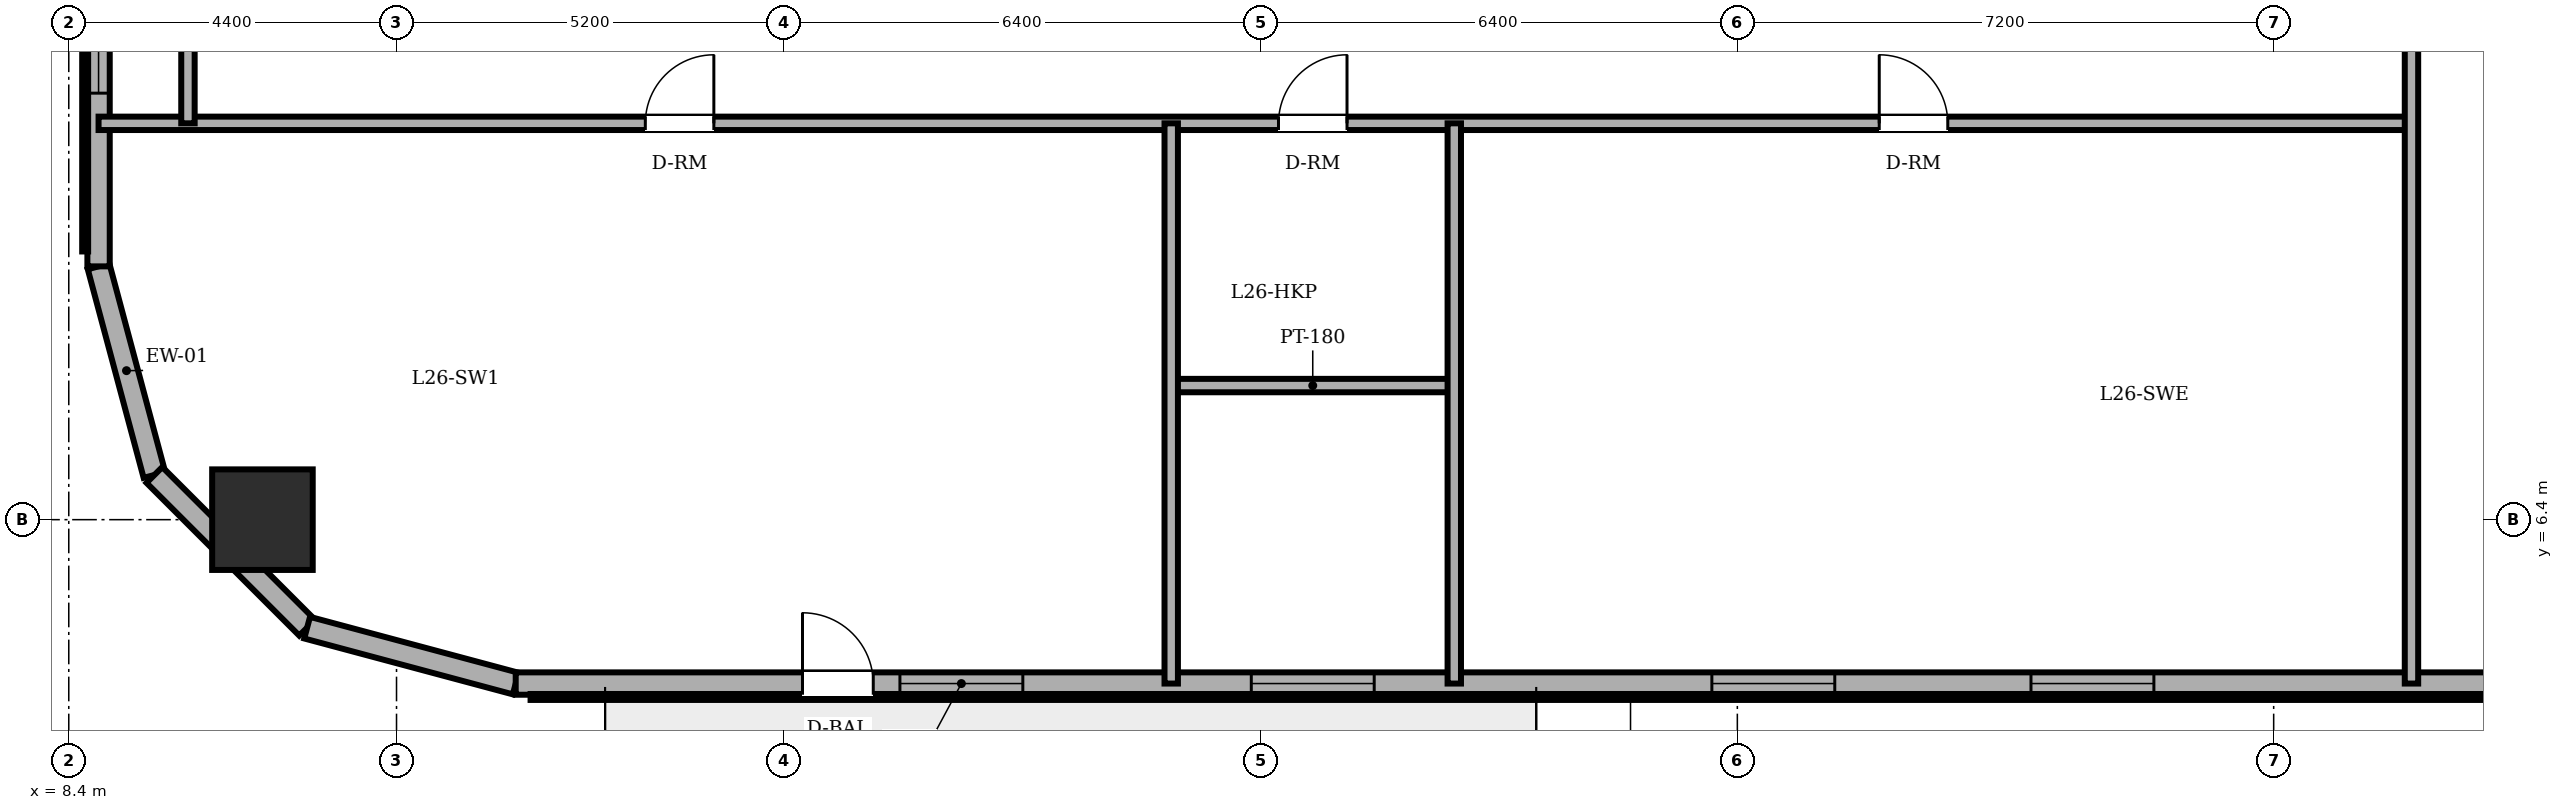
"""IFC4 building model, lengths in metres.
Left out: names, types, materials, properties, quantities, classifications, styles, units other than length and angle.
Written with IfcOpenShell. Run it as: python <this file> out.ifc"""

import sys

from ifc_helpers import new_model, si_unit, direction, frame, frame_2d, origin, origin_2d, place, context, subcontext, project, spatial, rectangle, circle, extrude, element, fill, save


model = new_model("IFC4")
c1 = context("Model", 3, precision=1e-05, world=origin(), true_north=direction((0.0, 1.0)))
c2 = subcontext(c1, "Body", "Model", "MODEL_VIEW")
j1 = project(units=[si_unit("LENGTHUNIT", "METRE"), si_unit("PLANEANGLEUNIT", "RADIAN")], contexts=[c1])
p1 = place(None, origin())
s1 = spatial("IfcSite", under=j1, at=p1, CompositionType="ELEMENT")
p2 = place(p1, origin())
s2 = spatial("IfcBuilding", under=s1, at=p2, CompositionType="ELEMENT")
p3 = place(p2, frame((0.0, 0.0, 100.7)))
s3 = spatial("IfcBuildingStorey", under=s2, at=p3, CompositionType="ELEMENT", Elevation=100.7)
p4 = place(p3, frame((11.0, 6.4, 0.0), z_axis=(0.0, 0.0, 1.0), x_axis=(1.0, 0.0, 0.0)))
e1 = element("IfcColumn", 1, at=p4, inside=s3, PredefinedType="COLUMN", context=c2, shape_type="SweptSolid", body=[
    extrude(circle(Radius=0.675, at=origin_2d()), origin(), (0.0, 0.0, 1.0), 3.6),
])
p5 = place(p3, frame((8.8, 9.8, 0.0), z_axis=(0.0, 0.0, 1.0), x_axis=(0.258731875344, -0.96594917914, 0.0)))
e2 = element("IfcWall", 2, at=p5, inside=s3, PredefinedType="SOLIDWALL", context=c2, shape_type="SweptSolid", body=[
    extrude(rectangle(XDim=2.899, YDim=0.3, at=frame_2d((1.449, 0.0))), origin(), (0.0, 0.0, 1.0), 3.4),
])
p6 = place(p3, frame((9.55, 7.0, 0.0), z_axis=(0.0, 0.0, 1.0), x_axis=(0.707106781187, -0.707106781187, 0.0)))
e3 = element("IfcWall", 3, at=p6, inside=s3, PredefinedType="SOLIDWALL", context=c2, shape_type="SweptSolid", body=[
    extrude(rectangle(XDim=2.899, YDim=0.3, at=frame_2d((1.45, 0.0))), origin(), (0.0, 0.0, 1.0), 3.4),
])
p7 = place(p3, frame((11.6, 4.95, 0.0), z_axis=(0.0, 0.0, 1.0), x_axis=(0.965943540406, -0.258752926066, 0.0)))
e4 = element("IfcWall", 4, at=p7, inside=s3, PredefinedType="SOLIDWALL", context=c2, shape_type="SweptSolid", body=[
    extrude(rectangle(XDim=2.898, YDim=0.3, at=frame_2d((1.449, 0.0))), origin(), (0.0, 0.0, 1.0), 3.4),
])
p8 = place(p3, frame((14.4, 4.2, 0.0), z_axis=(0.0, 0.0, 1.0), x_axis=(1.0, 0.0, 0.0)))
e5 = element("IfcWall", 5, at=p8, inside=s3, PredefinedType="SOLIDWALL", context=c2, shape_type="SweptSolid", body=[
    extrude(rectangle(XDim=29.933, YDim=0.3, at=frame_2d((14.967, 0.0))), origin(), (0.0, 0.0, 1.0), 3.4),
])
p9 = place(p8, frame((3.85, 0.0, 0.0)))
e6 = element("IfcOpeningElement", 6, at=p9, cuts=e5, PredefinedType="OPENING", context=c2, shape_type="SweptSolid", body=[
    extrude(rectangle(XDim=0.95, YDim=2.2, at=frame_2d((0.475, 1.1))), frame((0.0, 0.16, 0.0), z_axis=(0.0, -1.0, 0.0), x_axis=(1.0, 0.0, 0.0)), (0.0, 0.0, 1.0), 0.32),
])
p10 = place(p8, frame((5.158, 0.0, 0.85)))
e7 = element("IfcOpeningElement", 7, at=p10, cuts=e5, PredefinedType="OPENING", context=c2, shape_type="SweptSolid", body=[
    extrude(rectangle(XDim=1.65, YDim=1.55, at=frame_2d((0.825, 0.775))), frame((0.0, 0.16, 0.0), z_axis=(0.0, -1.0, 0.0), x_axis=(1.0, 0.0, 0.0)), (0.0, 0.0, 1.0), 0.32),
])
p11 = place(p8, frame((9.875, 0.0, 0.85)))
e8 = element("IfcOpeningElement", 8, at=p11, cuts=e5, PredefinedType="OPENING", context=c2, shape_type="SweptSolid", body=[
    extrude(rectangle(XDim=1.65, YDim=1.55, at=frame_2d((0.825, 0.775))), frame((0.0, 0.16, 0.0), z_axis=(0.0, -1.0, 0.0), x_axis=(1.0, 0.0, 0.0)), (0.0, 0.0, 1.0), 0.32),
])
p12 = place(p8, frame((16.058, 0.0, 0.85)))
e9 = element("IfcOpeningElement", 9, at=p12, cuts=e5, PredefinedType="OPENING", context=c2, shape_type="SweptSolid", body=[
    extrude(rectangle(XDim=1.65, YDim=1.55, at=frame_2d((0.825, 0.775))), frame((0.0, 0.16, 0.0), z_axis=(0.0, -1.0, 0.0), x_axis=(1.0, 0.0, 0.0)), (0.0, 0.0, 1.0), 0.32),
])
p13 = place(p8, frame((20.342, 0.0, 0.85)))
e10 = element("IfcOpeningElement", 10, at=p13, cuts=e5, PredefinedType="OPENING", context=c2, shape_type="SweptSolid", body=[
    extrude(rectangle(XDim=1.65, YDim=1.55, at=frame_2d((0.825, 0.775))), frame((0.0, 0.16, 0.0), z_axis=(0.0, -1.0, 0.0), x_axis=(1.0, 0.0, 0.0)), (0.0, 0.0, 1.0), 0.32),
])
p14 = place(p8, frame((26.692, 0.0, 0.85)))
e11 = element("IfcOpeningElement", 11, at=p14, cuts=e5, PredefinedType="OPENING", context=c2, shape_type="SweptSolid", body=[
    extrude(rectangle(XDim=1.65, YDim=1.55, at=frame_2d((0.825, 0.775))), frame((0.0, 0.16, 0.0), z_axis=(0.0, -1.0, 0.0), x_axis=(1.0, 0.0, 0.0)), (0.0, 0.0, 1.0), 0.32),
])
p15 = place(p3, frame((8.8, 38.2, 0.0), z_axis=(0.0, 0.0, 1.0), x_axis=(0.0, -1.0, 0.0)))
e12 = element("IfcWall", 12, at=p15, inside=s3, PredefinedType="SOLIDWALL", context=c2, shape_type="SweptSolid", body=[
    extrude(rectangle(XDim=28.4, YDim=0.3, at=frame_2d((14.2, 0.0))), origin(), (0.0, 0.0, 1.0), 3.4),
])
p16 = place(p15, frame((2.325, 0.0, 0.85)))
e13 = element("IfcOpeningElement", 13, at=p16, cuts=e12, PredefinedType="OPENING", context=c2, shape_type="SweptSolid", body=[
    extrude(rectangle(XDim=1.65, YDim=1.55, at=frame_2d((0.825, 0.775))), frame((0.0, 0.16, 0.0), z_axis=(0.0, -1.0, 0.0), x_axis=(1.0, 0.0, 0.0)), (0.0, 0.0, 1.0), 0.32),
])
p17 = place(p15, frame((7.328, 0.0, 0.85)))
e14 = element("IfcOpeningElement", 14, at=p17, cuts=e12, PredefinedType="OPENING", context=c2, shape_type="SweptSolid", body=[
    extrude(rectangle(XDim=1.65, YDim=1.55, at=frame_2d((0.825, 0.775))), frame((0.0, 0.16, 0.0), z_axis=(0.0, -1.0, 0.0), x_axis=(1.0, 0.0, 0.0)), (0.0, 0.0, 1.0), 0.32),
])
p18 = place(p15, frame((11.102, 0.0, 0.85)))
e15 = element("IfcOpeningElement", 15, at=p18, cuts=e12, PredefinedType="OPENING", context=c2, shape_type="SweptSolid", body=[
    extrude(rectangle(XDim=1.65, YDim=1.55, at=frame_2d((0.825, 0.775))), frame((0.0, 0.16, 0.0), z_axis=(0.0, -1.0, 0.0), x_axis=(1.0, 0.0, 0.0)), (0.0, 0.0, 1.0), 0.32),
])
p19 = place(p15, frame((17.648, 0.0, 0.85)))
e16 = element("IfcOpeningElement", 16, at=p19, cuts=e12, PredefinedType="OPENING", context=c2, shape_type="SweptSolid", body=[
    extrude(rectangle(XDim=1.65, YDim=1.55, at=frame_2d((0.825, 0.775))), frame((0.0, 0.16, 0.0), z_axis=(0.0, -1.0, 0.0), x_axis=(1.0, 0.0, 0.0)), (0.0, 0.0, 1.0), 0.32),
])
p20 = place(p15, frame((20.422, 0.0, 0.85)))
e17 = element("IfcOpeningElement", 17, at=p20, cuts=e12, PredefinedType="OPENING", context=c2, shape_type="SweptSolid", body=[
    extrude(rectangle(XDim=1.65, YDim=1.55, at=frame_2d((0.825, 0.775))), frame((0.0, 0.16, 0.0), z_axis=(0.0, -1.0, 0.0), x_axis=(1.0, 0.0, 0.0)), (0.0, 0.0, 1.0), 0.32),
])
p21 = place(p15, frame((24.425, 0.0, 0.85)))
e18 = element("IfcOpeningElement", 18, at=p21, cuts=e12, PredefinedType="OPENING", context=c2, shape_type="SweptSolid", body=[
    extrude(rectangle(XDim=1.65, YDim=1.55, at=frame_2d((0.825, 0.775))), frame((0.0, 0.16, 0.0), z_axis=(0.0, -1.0, 0.0), x_axis=(1.0, 0.0, 0.0)), (0.0, 0.0, 1.0), 0.32),
])
p22 = place(p3, frame((23.2, 8.2, 0.0), z_axis=(0.0, 0.0, 1.0), x_axis=(1.0, 0.0, 0.0)))
e19 = element("IfcWall", 19, at=p22, inside=s3, PredefinedType="PARTITIONING", context=c2, shape_type="SweptSolid", body=[
    extrude(rectangle(XDim=3.8, YDim=0.18, at=frame_2d((1.9, 0.0))), origin(), (0.0, 0.0, 1.0), 3.4),
])
p23 = place(p3, frame((8.8, 11.72, 0.0), z_axis=(0.0, 0.0, 1.0), x_axis=(1.0, 0.0, 0.0)))
e20 = element("IfcWall", 20, at=p23, inside=s3, PredefinedType="PARTITIONING", context=c2, shape_type="SweptSolid", body=[
    extrude(rectangle(XDim=31.05, YDim=0.18, at=frame_2d((15.525, 0.0))), origin(), (0.0, 0.0, 1.0), 3.4),
])
p24 = place(p23, frame((15.84, 0.0, 0.0)))
e21 = element("IfcOpeningElement", 21, at=p24, cuts=e20, PredefinedType="OPENING", context=c2, shape_type="SweptSolid", body=[
    extrude(rectangle(XDim=0.92, YDim=2.1, at=frame_2d((0.46, 1.05))), frame((0.0, 0.1, 0.0), z_axis=(0.0, -1.0, 0.0), x_axis=(1.0, 0.0, 0.0)), (0.0, 0.0, 1.0), 0.2),
])
p25 = place(p23, frame((7.34, 0.0, 0.0)))
e22 = element("IfcOpeningElement", 22, at=p25, cuts=e20, PredefinedType="OPENING", context=c2, shape_type="SweptSolid", body=[
    extrude(rectangle(XDim=0.92, YDim=2.1, at=frame_2d((0.46, 1.05))), frame((0.0, 0.1, 0.0), z_axis=(0.0, -1.0, 0.0), x_axis=(1.0, 0.0, 0.0)), (0.0, 0.0, 1.0), 0.2),
])
p26 = place(p23, frame((23.905, 0.0, 0.0)))
e23 = element("IfcOpeningElement", 23, at=p26, cuts=e20, PredefinedType="OPENING", context=c2, shape_type="SweptSolid", body=[
    extrude(rectangle(XDim=0.92, YDim=2.1, at=frame_2d((0.46, 1.05))), frame((0.0, 0.1, 0.0), z_axis=(0.0, -1.0, 0.0), x_axis=(1.0, 0.0, 0.0)), (0.0, 0.0, 1.0), 0.2),
])
p27 = place(p3, frame((10.0, 11.72, 0.0), z_axis=(0.0, 0.0, 1.0), x_axis=(0.0, 1.0, 0.0)))
e24 = element("IfcWall", 24, at=p27, inside=s3, PredefinedType="PARTITIONING", context=c2, shape_type="SweptSolid", body=[
    extrude(rectangle(XDim=2.46, YDim=0.18, at=frame_2d((1.23, 0.0))), origin(), (0.0, 0.0, 1.0), 3.4),
])
for number, where, z_axis, x_axis in (
    (25, (23.2, 4.2, 0.0), (0.0, 0.0, 1.0), (0.0, 1.0, 0.0)),
    (26, (27.0, 4.2, 0.0), (0.0, 0.0, 1.0), (0.0, 1.0, 0.0)),
):
    element("IfcWall", number, at=place(p3, frame(where, z_axis=z_axis, x_axis=x_axis)), inside=s3, PredefinedType="PARTITIONING", context=c2, shape_type="SweptSolid", body=[
        extrude(rectangle(XDim=7.52, YDim=0.18, at=frame_2d((3.76, 0.0))), origin(), (0.0, 0.0, 1.0), 3.4),
    ])
p28 = place(p3, frame((39.85, 4.2, 0.0), z_axis=(0.0, 0.0, 1.0), x_axis=(0.0, 1.0, 0.0)))
e27 = element("IfcWall", 27, at=p28, inside=s3, PredefinedType="PARTITIONING", context=c2, shape_type="SweptSolid", body=[
    extrude(rectangle(XDim=18.62, YDim=0.18, at=frame_2d((9.31, 0.0))), origin(), (0.0, 0.0, 1.0), 3.4),
])
p29 = place(p28, frame((12.31, 0.0, 0.0)))
e28 = element("IfcOpeningElement", 28, at=p29, cuts=e27, PredefinedType="OPENING", context=c2, shape_type="SweptSolid", body=[
    extrude(rectangle(XDim=1.0, YDim=2.15, at=frame_2d((0.5, 1.075))), frame((0.0, 0.1, 0.0), z_axis=(0.0, -1.0, 0.0), x_axis=(1.0, 0.0, 0.0)), (0.0, 0.0, 1.0), 0.2),
])
p30 = place(p9, origin())
e29 = element("IfcDoor", 29, at=p30, inside=s3, OperationType="SINGLE_SWING_LEFT", PredefinedType="DOOR", context=c2, shape_type="SweptSolid", body=[
    extrude(rectangle(XDim=0.95, YDim=2.2, at=frame_2d((0.475, 1.1))), frame((0.0, 0.025, 0.0), z_axis=(0.0, -1.0, 0.0), x_axis=(1.0, 0.0, 0.0)), (0.0, 0.0, 1.0), 0.05),
])
fill(e6, e29)
p31 = place(p10, origin())
e30 = element("IfcWindow", 30, at=p31, inside=s3, PartitioningType="DOUBLE_PANEL_VERTICAL", PredefinedType="WINDOW", context=c2, shape_type="SweptSolid", body=[
    extrude(rectangle(XDim=1.65, YDim=1.55, at=frame_2d((0.825, 0.775))), frame((0.0, 0.03, 0.0), z_axis=(0.0, -1.0, 0.0), x_axis=(1.0, 0.0, 0.0)), (0.0, 0.0, 1.0), 0.06),
])
fill(e7, e30)
p32 = place(p11, origin())
e31 = element("IfcWindow", 31, at=p32, inside=s3, PartitioningType="DOUBLE_PANEL_VERTICAL", PredefinedType="WINDOW", context=c2, shape_type="SweptSolid", body=[
    extrude(rectangle(XDim=1.65, YDim=1.55, at=frame_2d((0.825, 0.775))), frame((0.0, 0.03, 0.0), z_axis=(0.0, -1.0, 0.0), x_axis=(1.0, 0.0, 0.0)), (0.0, 0.0, 1.0), 0.06),
])
fill(e8, e31)
p33 = place(p12, origin())
e32 = element("IfcWindow", 32, at=p33, inside=s3, PartitioningType="DOUBLE_PANEL_VERTICAL", PredefinedType="WINDOW", context=c2, shape_type="SweptSolid", body=[
    extrude(rectangle(XDim=1.65, YDim=1.55, at=frame_2d((0.825, 0.775))), frame((0.0, 0.03, 0.0), z_axis=(0.0, -1.0, 0.0), x_axis=(1.0, 0.0, 0.0)), (0.0, 0.0, 1.0), 0.06),
])
fill(e9, e32)
p34 = place(p13, origin())
e33 = element("IfcWindow", 33, at=p34, inside=s3, PartitioningType="DOUBLE_PANEL_VERTICAL", PredefinedType="WINDOW", context=c2, shape_type="SweptSolid", body=[
    extrude(rectangle(XDim=1.65, YDim=1.55, at=frame_2d((0.825, 0.775))), frame((0.0, 0.03, 0.0), z_axis=(0.0, -1.0, 0.0), x_axis=(1.0, 0.0, 0.0)), (0.0, 0.0, 1.0), 0.06),
])
fill(e10, e33)
p35 = place(p21, origin())
e34 = element("IfcWindow", 34, at=p35, inside=s3, PartitioningType="DOUBLE_PANEL_VERTICAL", PredefinedType="WINDOW", context=c2, shape_type="SweptSolid", body=[
    extrude(rectangle(XDim=1.65, YDim=1.55, at=frame_2d((0.825, 0.775))), frame((0.0, 0.03, 0.0), z_axis=(0.0, -1.0, 0.0), x_axis=(1.0, 0.0, 0.0)), (0.0, 0.0, 1.0), 0.06),
])
fill(e18, e34)
p36 = place(p24, origin())
e35 = element("IfcDoor", 35, at=p36, inside=s3, OperationType="SINGLE_SWING_RIGHT", PredefinedType="DOOR", context=c2, shape_type="SweptSolid", body=[
    extrude(rectangle(XDim=0.92, YDim=2.1, at=frame_2d((0.46, 1.05))), frame((0.0, 0.025, 0.0), z_axis=(0.0, -1.0, 0.0), x_axis=(1.0, 0.0, 0.0)), (0.0, 0.0, 1.0), 0.05),
])
fill(e21, e35)
p37 = place(p25, origin())
e36 = element("IfcDoor", 36, at=p37, inside=s3, OperationType="SINGLE_SWING_RIGHT", PredefinedType="DOOR", context=c2, shape_type="SweptSolid", body=[
    extrude(rectangle(XDim=0.92, YDim=2.1, at=frame_2d((0.46, 1.05))), frame((0.0, 0.025, 0.0), z_axis=(0.0, -1.0, 0.0), x_axis=(1.0, 0.0, 0.0)), (0.0, 0.0, 1.0), 0.05),
])
fill(e22, e36)
p38 = place(p26, origin())
e37 = element("IfcDoor", 37, at=p38, inside=s3, OperationType="SINGLE_SWING_LEFT", PredefinedType="DOOR", context=c2, shape_type="SweptSolid", body=[
    extrude(rectangle(XDim=0.92, YDim=2.1, at=frame_2d((0.46, 1.05))), frame((0.0, 0.025, 0.0), z_axis=(0.0, -1.0, 0.0), x_axis=(1.0, 0.0, 0.0)), (0.0, 0.0, 1.0), 0.05),
])
fill(e23, e37)
save(model, sys.argv[1])
